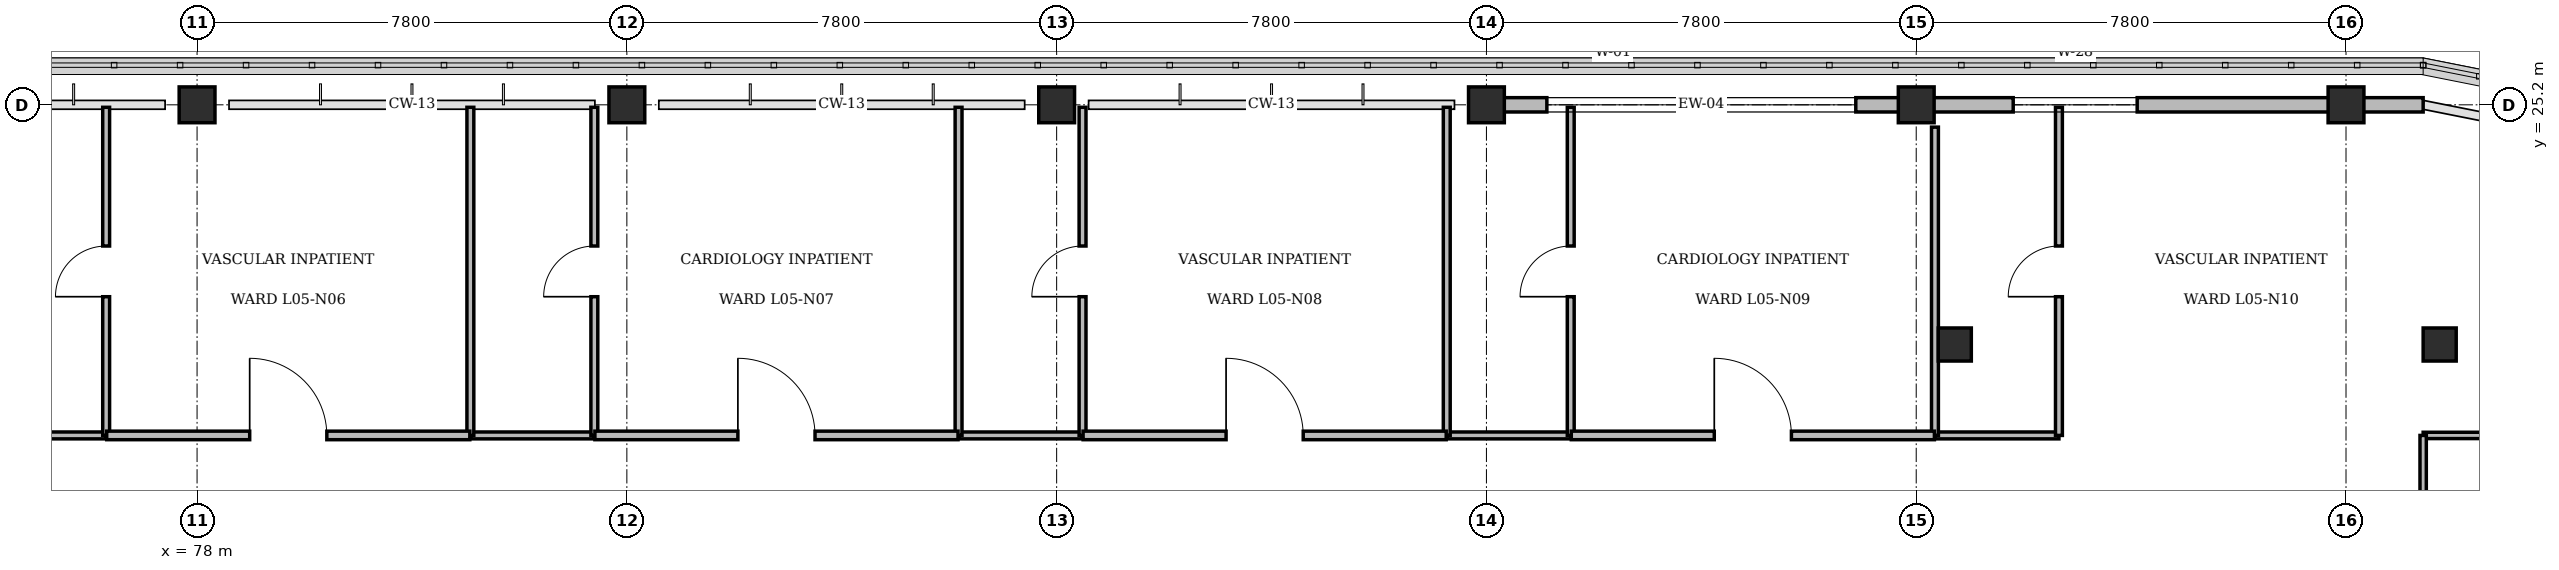
"""IFC4 building model, lengths in metres.
Left out: names, types, materials, properties, quantities, classifications, styles, units other than length and angle.
Written with IfcOpenShell. Run it as: python <this file> out.ifc"""

import sys

from ifc_helpers import new_model, si_unit, direction, frame, frame_2d, origin, origin_2d, place, context, subcontext, project, spatial, rectangle, circle, extrude, element, fill, save


model = new_model("IFC4")
c1 = context("Model", 3, precision=1e-05, world=origin(), true_north=direction((0.0, 1.0)))
c2 = subcontext(c1, "Body", "Model", "MODEL_VIEW")
j1 = project(units=[si_unit("LENGTHUNIT", "METRE"), si_unit("PLANEANGLEUNIT", "RADIAN")], contexts=[c1])
p1 = place(None, origin())
s1 = spatial("IfcSite", under=j1, at=p1, CompositionType="ELEMENT")
p2 = place(p1, origin())
s2 = spatial("IfcBuilding", under=s1, at=p2, CompositionType="ELEMENT")
p3 = place(p2, frame((0.0, 0.0, 22.2)))
s3 = spatial("IfcBuildingStorey", under=s2, at=p3, CompositionType="ELEMENT", Elevation=22.2)
for number, where, z_axis, x_axis in (
    (1, (78.0, 25.2, 0.0), (0.0, 0.0, 1.0), (1.0, 0.0, 0.0)),
    (2, (85.8, 25.2, 0.0), (0.0, 0.0, 1.0), (1.0, 0.0, 0.0)),
    (3, (93.6, 25.2, 0.0), (0.0, 0.0, 1.0), (1.0, 0.0, 0.0)),
    (4, (101.4, 25.2, 0.0), (0.0, 0.0, 1.0), (1.0, 0.0, 0.0)),
    (5, (109.2, 25.2, 0.0), (0.0, 0.0, 1.0), (1.0, 0.0, 0.0)),
    (6, (117.0, 25.2, 0.0), (0.0, 0.0, 1.0), (1.0, 0.0, 0.0)),
):
    element("IfcColumn", number, at=place(p3, frame(where, z_axis=z_axis, x_axis=x_axis)), inside=s3, PredefinedType="COLUMN", context=c2, shape_type="SweptSolid", body=[
        extrude(rectangle(XDim=0.65, YDim=0.65, at=origin_2d()), origin(), (0.0, 0.0, 1.0), 4.2),
    ])
for number, where, z_axis, x_axis in (
    (7, (118.7, 20.85, 0.0), (0.0, 0.0, 1.0), (1.0, 0.0, 0.0)),
    (8, (109.9, 20.85, 0.0), (0.0, 0.0, 1.0), (1.0, 0.0, 0.0)),
):
    element("IfcColumn", number, at=place(p3, frame(where, z_axis=z_axis, x_axis=x_axis)), inside=s3, PredefinedType="PILASTER", context=c2, shape_type="SweptSolid", body=[
        extrude(circle(Radius=0.3, at=origin_2d()), origin(), (0.0, 0.0, 1.0), 4.2),
    ])
p4 = place(p3, frame((101.69, 25.2, 0.0), z_axis=(0.0, 0.0, 1.0), x_axis=(1.0, 0.0, 0.0)))
e9 = element("IfcWall", 9, at=p4, inside=s3, PredefinedType="STANDARD", context=c2, shape_type="SweptSolid", body=[
    extrude(rectangle(XDim=7.22, YDim=0.26, at=frame_2d((3.61, 0.0))), origin(), (0.0, 0.0, 1.0), 3.305),
])
p5 = place(p4, frame((0.807, 0.0, 0.85)))
e10 = element("IfcOpeningElement", 10, at=p5, cuts=e9, PredefinedType="OPENING", context=c2, shape_type="SweptSolid", body=[
    extrude(rectangle(XDim=2.4, YDim=1.5, at=frame_2d((1.2, 0.75))), frame((0.0, 0.14, 0.0), z_axis=(0.0, -1.0, 0.0), x_axis=(1.0, 0.0, 0.0)), (0.0, 0.0, 1.0), 0.28),
])
p6 = place(p4, frame((4.013, 0.0, 0.85)))
e11 = element("IfcOpeningElement", 11, at=p6, cuts=e9, PredefinedType="OPENING", context=c2, shape_type="SweptSolid", body=[
    extrude(rectangle(XDim=2.4, YDim=1.5, at=frame_2d((1.2, 0.75))), frame((0.0, 0.14, 0.0), z_axis=(0.0, -1.0, 0.0), x_axis=(1.0, 0.0, 0.0)), (0.0, 0.0, 1.0), 0.28),
])
p7 = place(p3, frame((109.49, 25.2, 0.0), z_axis=(0.0, 0.0, 1.0), x_axis=(1.0, 0.0, 0.0)))
e12 = element("IfcWall", 12, at=p7, inside=s3, PredefinedType="STANDARD", context=c2, shape_type="SweptSolid", body=[
    extrude(rectangle(XDim=8.91, YDim=0.26, at=frame_2d((4.455, 0.0))), origin(), (0.0, 0.0, 1.0), 3.305),
])
p8 = place(p7, frame((1.47, 0.0, 0.85)))
e13 = element("IfcOpeningElement", 13, at=p8, cuts=e12, PredefinedType="OPENING", context=c2, shape_type="SweptSolid", body=[
    extrude(rectangle(XDim=2.25, YDim=1.45, at=frame_2d((1.125, 0.725))), frame((0.0, 0.14, 0.0), z_axis=(0.0, -1.0, 0.0), x_axis=(1.0, 0.0, 0.0)), (0.0, 0.0, 1.0), 0.28),
])
p9 = place(p3, frame((74.1, 19.2, 0.0), z_axis=(0.0, 0.0, 1.0), x_axis=(1.0, 0.0, 0.0)))
e14 = element("IfcWall", 14, at=p9, inside=s3, PredefinedType="PARTITIONING", context=c2, shape_type="SweptSolid", body=[
    extrude(rectangle(XDim=2.25, YDim=0.125, at=frame_2d((1.125, 0.0))), origin(), (0.0, 0.0, 1.0), 3.9),
])
p10 = place(p3, frame((76.35, 19.2, 0.0), z_axis=(0.0, 0.0, 1.0), x_axis=(0.0, 1.0, 0.0)))
e15 = element("IfcWall", 15, at=p10, inside=s3, PredefinedType="PARTITIONING", context=c2, shape_type="SweptSolid", body=[
    extrude(rectangle(XDim=5.955, YDim=0.125, at=frame_2d((2.978, 0.0))), origin(), (0.0, 0.0, 1.0), 3.9),
])
p11 = place(p10, frame((2.518, 0.0, 0.0)))
e16 = element("IfcOpeningElement", 16, at=p11, cuts=e15, PredefinedType="OPENING", context=c2, shape_type="SweptSolid", body=[
    extrude(rectangle(XDim=0.92, YDim=2.1, at=frame_2d((0.46, 1.05))), frame((0.0, 0.073, 0.0), z_axis=(0.0, -1.0, 0.0), x_axis=(1.0, 0.0, 0.0)), (0.0, 0.0, 1.0), 0.145),
])
p12 = place(p3, frame((82.96, 19.2, 0.0), z_axis=(0.0, 0.0, 1.0), x_axis=(1.0, 0.0, 0.0)))
e17 = element("IfcWall", 17, at=p12, inside=s3, PredefinedType="PARTITIONING", context=c2, shape_type="SweptSolid", body=[
    extrude(rectangle(XDim=2.25, YDim=0.125, at=frame_2d((1.125, 0.0))), origin(), (0.0, 0.0, 1.0), 3.9),
])
p13 = place(p3, frame((82.96, 19.2, 0.0), z_axis=(0.0, 0.0, 1.0), x_axis=(0.0, 1.0, 0.0)))
e18 = element("IfcWall", 18, at=p13, inside=s3, PredefinedType="PARTITIONING", context=c2, shape_type="SweptSolid", body=[
    extrude(rectangle(XDim=5.955, YDim=0.125, at=frame_2d((2.978, 0.0))), origin(), (0.0, 0.0, 1.0), 3.9),
])
p14 = place(p3, frame((85.21, 19.2, 0.0), z_axis=(0.0, 0.0, 1.0), x_axis=(0.0, 1.0, 0.0)))
e19 = element("IfcWall", 19, at=p14, inside=s3, PredefinedType="PARTITIONING", context=c2, shape_type="SweptSolid", body=[
    extrude(rectangle(XDim=5.955, YDim=0.125, at=frame_2d((2.978, 0.0))), origin(), (0.0, 0.0, 1.0), 3.9),
])
p15 = place(p14, frame((2.518, 0.0, 0.0)))
e20 = element("IfcOpeningElement", 20, at=p15, cuts=e19, PredefinedType="OPENING", context=c2, shape_type="SweptSolid", body=[
    extrude(rectangle(XDim=0.92, YDim=2.1, at=frame_2d((0.46, 1.05))), frame((0.0, 0.073, 0.0), z_axis=(0.0, -1.0, 0.0), x_axis=(1.0, 0.0, 0.0)), (0.0, 0.0, 1.0), 0.145),
])
p16 = place(p3, frame((91.82, 19.2, 0.0), z_axis=(0.0, 0.0, 1.0), x_axis=(1.0, 0.0, 0.0)))
e21 = element("IfcWall", 21, at=p16, inside=s3, PredefinedType="PARTITIONING", context=c2, shape_type="SweptSolid", body=[
    extrude(rectangle(XDim=2.25, YDim=0.125, at=frame_2d((1.125, 0.0))), origin(), (0.0, 0.0, 1.0), 3.9),
])
p17 = place(p3, frame((91.82, 19.2, 0.0), z_axis=(0.0, 0.0, 1.0), x_axis=(0.0, 1.0, 0.0)))
e22 = element("IfcWall", 22, at=p17, inside=s3, PredefinedType="PARTITIONING", context=c2, shape_type="SweptSolid", body=[
    extrude(rectangle(XDim=5.955, YDim=0.125, at=frame_2d((2.978, 0.0))), origin(), (0.0, 0.0, 1.0), 3.9),
])
p18 = place(p3, frame((94.07, 19.2, 0.0), z_axis=(0.0, 0.0, 1.0), x_axis=(0.0, 1.0, 0.0)))
e23 = element("IfcWall", 23, at=p18, inside=s3, PredefinedType="PARTITIONING", context=c2, shape_type="SweptSolid", body=[
    extrude(rectangle(XDim=5.955, YDim=0.125, at=frame_2d((2.978, 0.0))), origin(), (0.0, 0.0, 1.0), 3.27),
])
p19 = place(p18, frame((2.518, 0.0, 0.0)))
e24 = element("IfcOpeningElement", 24, at=p19, cuts=e23, PredefinedType="OPENING", context=c2, shape_type="SweptSolid", body=[
    extrude(rectangle(XDim=0.92, YDim=2.1, at=frame_2d((0.46, 1.05))), frame((0.0, 0.073, 0.0), z_axis=(0.0, -1.0, 0.0), x_axis=(1.0, 0.0, 0.0)), (0.0, 0.0, 1.0), 0.145),
])
p20 = place(p3, frame((100.68, 19.2, 0.0), z_axis=(0.0, 0.0, 1.0), x_axis=(1.0, 0.0, 0.0)))
e25 = element("IfcWall", 25, at=p20, inside=s3, PredefinedType="PARTITIONING", context=c2, shape_type="SweptSolid", body=[
    extrude(rectangle(XDim=2.25, YDim=0.125, at=frame_2d((1.125, 0.0))), origin(), (0.0, 0.0, 1.0), 3.9),
])
p21 = place(p3, frame((100.68, 19.2, 0.0), z_axis=(0.0, 0.0, 1.0), x_axis=(0.0, 1.0, 0.0)))
e26 = element("IfcWall", 26, at=p21, inside=s3, PredefinedType="PARTITIONING", context=c2, shape_type="SweptSolid", body=[
    extrude(rectangle(XDim=5.955, YDim=0.125, at=frame_2d((2.978, 0.0))), origin(), (0.0, 0.0, 1.0), 3.9),
])
p22 = place(p3, frame((102.93, 19.2, 0.0), z_axis=(0.0, 0.0, 1.0), x_axis=(0.0, 1.0, 0.0)))
e27 = element("IfcWall", 27, at=p22, inside=s3, PredefinedType="PARTITIONING", context=c2, shape_type="SweptSolid", body=[
    extrude(rectangle(XDim=5.955, YDim=0.125, at=frame_2d((2.978, 0.0))), origin(), (0.0, 0.0, 1.0), 3.9),
])
p23 = place(p22, frame((2.518, 0.0, 0.0)))
e28 = element("IfcOpeningElement", 28, at=p23, cuts=e27, PredefinedType="OPENING", context=c2, shape_type="SweptSolid", body=[
    extrude(rectangle(XDim=0.92, YDim=2.1, at=frame_2d((0.46, 1.05))), frame((0.0, 0.073, 0.0), z_axis=(0.0, -1.0, 0.0), x_axis=(1.0, 0.0, 0.0)), (0.0, 0.0, 1.0), 0.145),
])
p24 = place(p3, frame((109.54, 19.2, 0.0), z_axis=(0.0, 0.0, 1.0), x_axis=(1.0, 0.0, 0.0)))
e29 = element("IfcWall", 29, at=p24, inside=s3, PredefinedType="PARTITIONING", context=c2, shape_type="SweptSolid", body=[
    extrude(rectangle(XDim=2.25, YDim=0.125, at=frame_2d((1.125, 0.0))), origin(), (0.0, 0.0, 1.0), 3.9),
])
p25 = place(p3, frame((109.54, 19.2, 0.0), z_axis=(0.0, 0.0, 1.0), x_axis=(0.0, 1.0, 0.0)))
e30 = element("IfcWall", 30, at=p25, inside=s3, PredefinedType="PARTITIONING", context=c2, shape_type="SweptSolid", body=[
    extrude(rectangle(XDim=5.595, YDim=0.125, at=frame_2d((2.797, 0.0))), origin(), (0.0, 0.0, 1.0), 3.27),
])
p26 = place(p3, frame((111.79, 19.2, 0.0), z_axis=(0.0, 0.0, 1.0), x_axis=(0.0, 1.0, 0.0)))
e31 = element("IfcWall", 31, at=p26, inside=s3, PredefinedType="PARTITIONING", context=c2, shape_type="SweptSolid", body=[
    extrude(rectangle(XDim=5.955, YDim=0.125, at=frame_2d((2.978, 0.0))), origin(), (0.0, 0.0, 1.0), 3.9),
])
p27 = place(p26, frame((2.518, 0.0, 0.0)))
e32 = element("IfcOpeningElement", 32, at=p27, cuts=e31, PredefinedType="OPENING", context=c2, shape_type="SweptSolid", body=[
    extrude(rectangle(XDim=0.92, YDim=2.1, at=frame_2d((0.46, 1.05))), frame((0.0, 0.073, 0.0), z_axis=(0.0, -1.0, 0.0), x_axis=(1.0, 0.0, 0.0)), (0.0, 0.0, 1.0), 0.145),
])
p28 = place(p3, frame((118.4, 19.2, 0.0), z_axis=(0.0, 0.0, 1.0), x_axis=(1.0, 0.0, 0.0)))
e33 = element("IfcWall", 33, at=p28, inside=s3, PredefinedType="PARTITIONING", context=c2, shape_type="SweptSolid", body=[
    extrude(rectangle(XDim=12.1, YDim=0.115, at=frame_2d((6.05, 0.0))), origin(), (0.0, 0.0, 1.0), 3.9),
])
p29 = place(p3, frame((118.4, 6.0, 0.0), z_axis=(0.0, 0.0, 1.0), x_axis=(0.0, 1.0, 0.0)))
e34 = element("IfcWall", 34, at=p29, inside=s3, PredefinedType="PARTITIONING", context=c2, shape_type="SweptSolid", body=[
    extrude(rectangle(XDim=13.2, YDim=0.115, at=frame_2d((6.6, 0.0))), origin(), (0.0, 0.0, 1.0), 3.9),
])
p30 = place(p29, frame((0.25, 0.0, 0.0)))
e35 = element("IfcOpeningElement", 35, at=p30, cuts=e34, PredefinedType="OPENING", context=c2, shape_type="SweptSolid", body=[
    extrude(rectangle(XDim=1.32, YDim=2.15, at=frame_2d((0.66, 1.075))), frame((0.0, 0.067, 0.0), z_axis=(0.0, -1.0, 0.0), x_axis=(1.0, 0.0, 0.0)), (0.0, 0.0, 1.0), 0.135),
])
p31 = place(p3, frame((76.36, 19.2, 0.0), z_axis=(0.0, 0.0, 1.0), x_axis=(1.0, 0.0, 0.0)))
e36 = element("IfcWall", 36, at=p31, inside=s3, PredefinedType="PARTITIONING", context=c2, shape_type="SweptSolid", body=[
    extrude(rectangle(XDim=6.59, YDim=0.155, at=frame_2d((3.295, 0.0))), origin(), (0.0, 0.0, 1.0), 3.9),
])
p32 = place(p31, frame((2.595, 0.0, 0.0)))
e37 = element("IfcOpeningElement", 37, at=p32, cuts=e36, PredefinedType="OPENING", context=c2, shape_type="SweptSolid", body=[
    extrude(rectangle(XDim=1.4, YDim=2.2, at=frame_2d((0.7, 1.1))), frame((0.0, 0.087, 0.0), z_axis=(0.0, -1.0, 0.0), x_axis=(1.0, 0.0, 0.0)), (0.0, 0.0, 1.0), 0.175),
])
p33 = place(p3, frame((85.22, 19.2, 0.0), z_axis=(0.0, 0.0, 1.0), x_axis=(1.0, 0.0, 0.0)))
e38 = element("IfcWall", 38, at=p33, inside=s3, PredefinedType="PARTITIONING", context=c2, shape_type="SweptSolid", body=[
    extrude(rectangle(XDim=6.59, YDim=0.155, at=frame_2d((3.295, 0.0))), origin(), (0.0, 0.0, 1.0), 3.9),
])
p34 = place(p33, frame((2.595, 0.0, 0.0)))
e39 = element("IfcOpeningElement", 39, at=p34, cuts=e38, PredefinedType="OPENING", context=c2, shape_type="SweptSolid", body=[
    extrude(rectangle(XDim=1.4, YDim=2.2, at=frame_2d((0.7, 1.1))), frame((0.0, 0.087, 0.0), z_axis=(0.0, -1.0, 0.0), x_axis=(1.0, 0.0, 0.0)), (0.0, 0.0, 1.0), 0.175),
])
p35 = place(p3, frame((94.08, 19.2, 0.0), z_axis=(0.0, 0.0, 1.0), x_axis=(1.0, 0.0, 0.0)))
e40 = element("IfcWall", 40, at=p35, inside=s3, PredefinedType="PARTITIONING", context=c2, shape_type="SweptSolid", body=[
    extrude(rectangle(XDim=6.59, YDim=0.155, at=frame_2d((3.295, 0.0))), origin(), (0.0, 0.0, 1.0), 3.9),
])
p36 = place(p35, frame((2.595, 0.0, 0.0)))
e41 = element("IfcOpeningElement", 41, at=p36, cuts=e40, PredefinedType="OPENING", context=c2, shape_type="SweptSolid", body=[
    extrude(rectangle(XDim=1.4, YDim=2.2, at=frame_2d((0.7, 1.1))), frame((0.0, 0.087, 0.0), z_axis=(0.0, -1.0, 0.0), x_axis=(1.0, 0.0, 0.0)), (0.0, 0.0, 1.0), 0.175),
])
p37 = place(p3, frame((102.94, 19.2, 0.0), z_axis=(0.0, 0.0, 1.0), x_axis=(1.0, 0.0, 0.0)))
e42 = element("IfcWall", 42, at=p37, inside=s3, PredefinedType="PARTITIONING", context=c2, shape_type="SweptSolid", body=[
    extrude(rectangle(XDim=6.59, YDim=0.155, at=frame_2d((3.295, 0.0))), origin(), (0.0, 0.0, 1.0), 3.9),
])
p38 = place(p37, frame((2.595, 0.0, 0.0)))
e43 = element("IfcOpeningElement", 43, at=p38, cuts=e42, PredefinedType="OPENING", context=c2, shape_type="SweptSolid", body=[
    extrude(rectangle(XDim=1.4, YDim=2.2, at=frame_2d((0.7, 1.1))), frame((0.0, 0.087, 0.0), z_axis=(0.0, -1.0, 0.0), x_axis=(1.0, 0.0, 0.0)), (0.0, 0.0, 1.0), 0.175),
])
p39 = place(p5, origin())
e44 = element("IfcWindow", 44, at=p39, inside=s3, PartitioningType="SINGLE_PANEL", PredefinedType="WINDOW", context=c2, shape_type="SweptSolid", body=[
    extrude(rectangle(XDim=2.4, YDim=1.5, at=frame_2d((1.2, 0.75))), frame((0.0, 0.03, 0.0), z_axis=(0.0, -1.0, 0.0), x_axis=(1.0, 0.0, 0.0)), (0.0, 0.0, 1.0), 0.06),
])
fill(e10, e44)
p40 = place(p6, origin())
e45 = element("IfcWindow", 45, at=p40, inside=s3, PartitioningType="SINGLE_PANEL", PredefinedType="WINDOW", context=c2, shape_type="SweptSolid", body=[
    extrude(rectangle(XDim=2.4, YDim=1.5, at=frame_2d((1.2, 0.75))), frame((0.0, 0.03, 0.0), z_axis=(0.0, -1.0, 0.0), x_axis=(1.0, 0.0, 0.0)), (0.0, 0.0, 1.0), 0.06),
])
fill(e11, e45)
p41 = place(p8, origin())
e46 = element("IfcWindow", 46, at=p41, inside=s3, PartitioningType="SINGLE_PANEL", PredefinedType="WINDOW", context=c2, shape_type="SweptSolid", body=[
    extrude(rectangle(XDim=2.25, YDim=1.45, at=frame_2d((1.125, 0.725))), frame((0.0, 0.03, 0.0), z_axis=(0.0, -1.0, 0.0), x_axis=(1.0, 0.0, 0.0)), (0.0, 0.0, 1.0), 0.06),
])
fill(e13, e46)
p42 = place(p11, origin())
e47 = element("IfcDoor", 47, at=p42, inside=s3, OperationType="SINGLE_SWING_LEFT", PredefinedType="DOOR", context=c2, shape_type="SweptSolid", body=[
    extrude(rectangle(XDim=0.92, YDim=2.1, at=frame_2d((0.46, 1.05))), frame((0.0, 0.025, 0.0), z_axis=(0.0, -1.0, 0.0), x_axis=(1.0, 0.0, 0.0)), (0.0, 0.0, 1.0), 0.05),
])
fill(e16, e47)
p43 = place(p15, origin())
e48 = element("IfcDoor", 48, at=p43, inside=s3, OperationType="SINGLE_SWING_LEFT", PredefinedType="DOOR", context=c2, shape_type="SweptSolid", body=[
    extrude(rectangle(XDim=0.92, YDim=2.1, at=frame_2d((0.46, 1.05))), frame((0.0, 0.025, 0.0), z_axis=(0.0, -1.0, 0.0), x_axis=(1.0, 0.0, 0.0)), (0.0, 0.0, 1.0), 0.05),
])
fill(e20, e48)
p44 = place(p19, origin())
e49 = element("IfcDoor", 49, at=p44, inside=s3, OperationType="SINGLE_SWING_LEFT", PredefinedType="DOOR", context=c2, shape_type="SweptSolid", body=[
    extrude(rectangle(XDim=0.92, YDim=2.1, at=frame_2d((0.46, 1.05))), frame((0.0, 0.025, 0.0), z_axis=(0.0, -1.0, 0.0), x_axis=(1.0, 0.0, 0.0)), (0.0, 0.0, 1.0), 0.05),
])
fill(e24, e49)
p45 = place(p23, origin())
e50 = element("IfcDoor", 50, at=p45, inside=s3, OperationType="SINGLE_SWING_LEFT", PredefinedType="DOOR", context=c2, shape_type="SweptSolid", body=[
    extrude(rectangle(XDim=0.92, YDim=2.1, at=frame_2d((0.46, 1.05))), frame((0.0, 0.025, 0.0), z_axis=(0.0, -1.0, 0.0), x_axis=(1.0, 0.0, 0.0)), (0.0, 0.0, 1.0), 0.05),
])
fill(e28, e50)
p46 = place(p27, origin())
e51 = element("IfcDoor", 51, at=p46, inside=s3, OperationType="SINGLE_SWING_LEFT", PredefinedType="DOOR", context=c2, shape_type="SweptSolid", body=[
    extrude(rectangle(XDim=0.92, YDim=2.1, at=frame_2d((0.46, 1.05))), frame((0.0, 0.025, 0.0), z_axis=(0.0, -1.0, 0.0), x_axis=(1.0, 0.0, 0.0)), (0.0, 0.0, 1.0), 0.05),
])
fill(e32, e51)
p47 = place(p32, origin())
e52 = element("IfcDoor", 52, at=p47, inside=s3, OperationType="SINGLE_SWING_LEFT", PredefinedType="DOOR", context=c2, shape_type="SweptSolid", body=[
    extrude(rectangle(XDim=1.4, YDim=2.2, at=frame_2d((0.7, 1.1))), frame((0.0, 0.025, 0.0), z_axis=(0.0, -1.0, 0.0), x_axis=(1.0, 0.0, 0.0)), (0.0, 0.0, 1.0), 0.05),
])
fill(e37, e52)
p48 = place(p34, origin())
e53 = element("IfcDoor", 53, at=p48, inside=s3, OperationType="SINGLE_SWING_LEFT", PredefinedType="DOOR", context=c2, shape_type="SweptSolid", body=[
    extrude(rectangle(XDim=1.4, YDim=2.2, at=frame_2d((0.7, 1.1))), frame((0.0, 0.025, 0.0), z_axis=(0.0, -1.0, 0.0), x_axis=(1.0, 0.0, 0.0)), (0.0, 0.0, 1.0), 0.05),
])
fill(e39, e53)
p49 = place(p36, origin())
e54 = element("IfcDoor", 54, at=p49, inside=s3, OperationType="SINGLE_SWING_LEFT", PredefinedType="DOOR", context=c2, shape_type="SweptSolid", body=[
    extrude(rectangle(XDim=1.4, YDim=2.2, at=frame_2d((0.7, 1.1))), frame((0.0, 0.025, 0.0), z_axis=(0.0, -1.0, 0.0), x_axis=(1.0, 0.0, 0.0)), (0.0, 0.0, 1.0), 0.05),
])
fill(e41, e54)
p50 = place(p38, origin())
e55 = element("IfcDoor", 55, at=p50, inside=s3, OperationType="SINGLE_SWING_LEFT", PredefinedType="DOOR", context=c2, shape_type="SweptSolid", body=[
    extrude(rectangle(XDim=1.4, YDim=2.2, at=frame_2d((0.7, 1.1))), frame((0.0, 0.025, 0.0), z_axis=(0.0, -1.0, 0.0), x_axis=(1.0, 0.0, 0.0)), (0.0, 0.0, 1.0), 0.05),
])
fill(e43, e55)
save(model, sys.argv[1])
